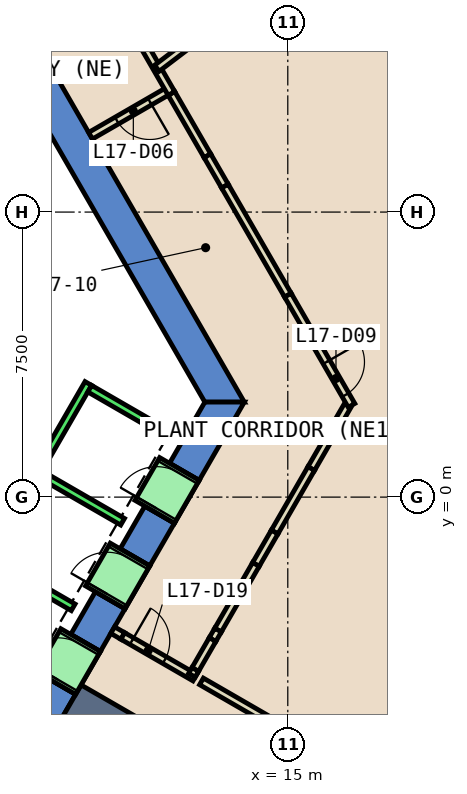
"""IFC4 building model, lengths in metres.
Left out: names, types, materials, properties, quantities, classifications, styles, units other than length and angle.
Written with IfcOpenShell. Run it as: python <this file> out.ifc"""

import sys

from ifc_helpers import new_model, si_unit, direction, frame, frame_2d, origin, place, context, subcontext, project, spatial, polyline, rectangle, outline, extrude, element, fill, save


model = new_model("IFC4")
c1 = context("Model", 3, precision=1e-05, world=origin(), true_north=direction((0.0, 1.0)))
c2 = subcontext(c1, "Body", "Model", "MODEL_VIEW")
j1 = project(units=[si_unit("LENGTHUNIT", "METRE"), si_unit("PLANEANGLEUNIT", "RADIAN")], contexts=[c1])
p1 = place(None, origin())
s1 = spatial("IfcSite", under=j1, at=p1, CompositionType="ELEMENT")
p2 = place(p1, origin())
s2 = spatial("IfcBuilding", under=s1, at=p2, CompositionType="ELEMENT")
p3 = place(p2, frame((0.0, 0.0, 81.2)))
s3 = spatial("IfcBuildingStorey", under=s2, at=p3, CompositionType="ELEMENT", Elevation=81.2)
p4 = place(p3, frame((0.0, 0.0, -0.6)))
e1 = element("IfcWall", 1, at=p4, inside=s3, PredefinedType="SHEAR", context=c2, shape_type="SweptSolid", body=[
    extrude(outline(polyline([(8.517, 11.747), (7.738, 11.298), (12.817, 2.5), (13.856, 2.5), (8.517, 11.747)])), origin(), (0.0, 0.0, 1.0), 5.4),
])
p5 = place(p3, frame((0.0, 0.0, -0.6)))
e2 = element("IfcWall", 2, at=p5, inside=s3, PredefinedType="SHEAR", context=c2, shape_type="SweptSolid", body=[
    extrude(outline(polyline([(9.417, -5.189), (8.638, -4.739), (7.988, -5.864), (8.767, -6.314), (9.417, -5.189)])), origin(), (0.0, 0.0, 1.0), 5.4),
])
p6 = place(p3, frame((0.0, 0.0, -0.6)))
e3 = element("IfcWall", 3, at=p6, inside=s3, PredefinedType="SHEAR", context=c2, shape_type="SweptSolid", body=[
    extrude(outline(polyline([(10.717, -2.937), (9.938, -2.487), (9.288, -3.613), (10.067, -4.063), (10.717, -2.937)])), origin(), (0.0, 0.0, 1.0), 5.4),
])
p7 = place(p3, frame((0.0, 0.0, -0.6)))
e4 = element("IfcWall", 4, at=p7, inside=s3, PredefinedType="SHEAR", context=c2, shape_type="SweptSolid", body=[
    extrude(outline(polyline([(12.017, -0.686), (11.238, -0.236), (10.588, -1.361), (11.367, -1.811), (12.017, -0.686)])), origin(), (0.0, 0.0, 1.0), 5.4),
])
p8 = place(p3, frame((0.0, 0.0, -0.6)))
e5 = element("IfcWall", 5, at=p8, inside=s3, PredefinedType="SHEAR", context=c2, shape_type="SweptSolid", body=[
    extrude(outline(polyline([(11.888, 0.89), (12.667, 0.44), (13.856, 2.5), (12.817, 2.5), (11.888, 0.89)])), origin(), (0.0, 0.0, 1.0), 5.4),
])
p9 = place(p3, frame((0.0, 0.0, 3.6)))
e6 = element("IfcWall", 6, at=p9, inside=s3, PredefinedType="SHEAR", context=c2, shape_type="SweptSolid", body=[
    extrude(outline(polyline([(10.067, -4.063), (9.288, -3.613), (8.638, -4.739), (9.417, -5.189), (10.067, -4.063)])), origin(), (0.0, 0.0, 1.0), 1.2),
])
p10 = place(p3, frame((0.0, 0.0, 3.6)))
e7 = element("IfcWall", 7, at=p10, inside=s3, PredefinedType="SHEAR", context=c2, shape_type="SweptSolid", body=[
    extrude(outline(polyline([(11.367, -1.811), (10.588, -1.361), (9.938, -2.487), (10.717, -2.937), (11.367, -1.811)])), origin(), (0.0, 0.0, 1.0), 1.2),
])
p11 = place(p3, frame((0.0, 0.0, 3.6)))
e8 = element("IfcWall", 8, at=p11, inside=s3, PredefinedType="SHEAR", context=c2, shape_type="SweptSolid", body=[
    extrude(outline(polyline([(12.667, 0.44), (11.888, 0.89), (11.238, -0.236), (12.017, -0.686), (12.667, 0.44)])), origin(), (0.0, 0.0, 1.0), 1.2),
])
p12 = place(p3, frame((9.31, -5.375, 0.0), z_axis=(0.0, 0.0, 1.0), x_axis=(0.866022967049, -0.500004220526, 0.0)))
e9 = element("IfcWall", 9, at=p12, inside=s3, PredefinedType="SHEAR", context=c2, shape_type="SweptSolid", body=[
    extrude(rectangle(XDim=35.802, YDim=1.0, at=frame_2d((17.901, 0.0))), origin(), (0.0, 0.0, 1.0), 4.8),
])
p13 = place(p3, frame((10.392, -3.5, 0.0), z_axis=(0.0, 0.0, 1.0), x_axis=(0.865244904171, -0.501349434832, 0.0)))
e10 = element("IfcWall", 10, at=p13, inside=s3, PredefinedType="PARTITIONING", context=c2, shape_type="SweptSolid", body=[
    extrude(rectangle(XDim=0.307, YDim=0.2, at=frame_2d((0.154, 0.0))), origin(), (0.0, 0.0, 1.0), 1.7),
])
p14 = place(p3, frame((12.729, -4.849, 0.0), z_axis=(0.0, 0.0, 1.0), x_axis=(0.866039668463, -0.499975292037, 0.0)))
e11 = element("IfcWall", 11, at=p14, inside=s3, PredefinedType="PARTITIONING", context=c2, shape_type="SweptSolid", body=[
    extrude(rectangle(XDim=33.573, YDim=0.2, at=frame_2d((16.787, 0.0))), origin(), (0.0, 0.0, 1.0), 4.8),
])
p15 = place(p3, frame((11.888, 10.709, 0.0), z_axis=(0.0, 0.0, 1.0), x_axis=(-0.865973769406, -0.500089422704, 0.0)))
e12 = element("IfcWall", 12, at=p15, inside=s3, PredefinedType="PARTITIONING", context=c2, shape_type="SweptSolid", body=[
    extrude(rectangle(XDim=2.399, YDim=0.2, at=frame_2d((1.2, 0.0))), origin(), (0.0, 0.0, 1.0), 4.8),
])
p16 = place(p15, frame((0.6, 0.0, 0.0)))
e13 = element("IfcOpeningElement", 13, at=p16, cuts=e12, PredefinedType="OPENING", context=c2, shape_type="SweptSolid", body=[
    extrude(rectangle(XDim=1.0, YDim=2.1, at=frame_2d((0.5, 1.05))), frame((0.0, 0.11, 0.0), z_axis=(0.0, -1.0, 0.0), x_axis=(1.0, 0.0, 0.0)), (0.0, 0.0, 1.0), 0.22),
])
p17 = place(p3, frame((11.938, 10.622, 0.0), z_axis=(0.0, 0.0, 1.0), x_axis=(0.499811688139, -0.866134098394, 0.0)))
e14 = element("IfcWall", 14, at=p17, inside=s3, PredefinedType="PARTITIONING", context=c2, shape_type="SweptSolid", body=[
    extrude(rectangle(XDim=1.895, YDim=0.2, at=frame_2d((0.947, 0.0))), origin(), (0.0, 0.0, 1.0), 4.8),
])
p18 = place(p3, frame((16.577, 2.413, 0.0), z_axis=(0.0, 0.0, 1.0), x_axis=(-0.499850094852, -0.866111934265, 0.0)))
e15 = element("IfcWall", 15, at=p18, inside=s3, PredefinedType="PARTITIONING", context=c2, shape_type="SweptSolid", body=[
    extrude(rectangle(XDim=0.828, YDim=0.2, at=frame_2d((0.414, 0.0))), origin(), (0.0, 0.0, 1.0), 4.8),
])
p19 = place(p3, frame((10.658, -3.654, 0.0), z_axis=(0.0, 0.0, 1.0), x_axis=(0.866074224396, -0.499915430684, 0.0)))
e16 = element("IfcWall", 16, at=p19, inside=s3, PredefinedType="PARTITIONING", context=c2, shape_type="SweptSolid", body=[
    extrude(rectangle(XDim=2.19, YDim=0.2, at=frame_2d((1.095, 0.0))), origin(), (0.0, 0.0, 1.0), 4.8),
])
p20 = place(p19, frame((0.272, 0.0, 0.0)))
e17 = element("IfcOpeningElement", 17, at=p20, cuts=e16, PredefinedType="OPENING", context=c2, shape_type="SweptSolid", body=[
    extrude(rectangle(XDim=1.0, YDim=2.1, at=frame_2d((0.5, 1.05))), frame((0.0, 0.11, 0.0), z_axis=(0.0, -1.0, 0.0), x_axis=(1.0, 0.0, 0.0)), (0.0, 0.0, 1.0), 0.22),
])
p21 = place(p3, frame((11.211, 11.882, 0.0), z_axis=(0.0, 0.0, 1.0), x_axis=(0.49978541015, -0.866149261849, 0.0)))
e18 = element("IfcWall", 18, at=p21, inside=s3, PredefinedType="PARTITIONING", context=c2, shape_type="SweptSolid", body=[
    extrude(rectangle(XDim=1.455, YDim=0.2, at=frame_2d((0.728, 0.0))), origin(), (0.0, 0.0, 1.0), 4.8),
])
p22 = place(p3, frame((12.885, 8.981, 0.0), z_axis=(0.0, 0.0, 1.0), x_axis=(0.500242282693, -0.865885476611, 0.0)))
e19 = element("IfcWall", 19, at=p22, inside=s3, PredefinedType="PARTITIONING", context=c2, shape_type="SweptSolid", body=[
    extrude(rectangle(XDim=0.921, YDim=0.2, at=frame_2d((0.461, 0.0))), origin(), (0.0, 0.0, 1.0), 2.4),
])
p23 = place(p3, frame((13.346, 8.183, 0.0), z_axis=(0.0, 0.0, 1.0), x_axis=(0.499981780173, -0.866035922751, 0.0)))
e20 = element("IfcWall", 20, at=p23, inside=s3, PredefinedType="PARTITIONING", context=c2, shape_type="SweptSolid", body=[
    extrude(rectangle(XDim=3.314, YDim=0.2, at=frame_2d((1.657, 0.0))), origin(), (0.0, 0.0, 1.0), 4.8),
])
p24 = place(p3, frame((15.003, 5.313, 0.0), z_axis=(0.0, 0.0, 1.0), x_axis=(0.499715696113, -0.8661894845, 0.0)))
e21 = element("IfcWall", 21, at=p24, inside=s3, PredefinedType="PARTITIONING", context=c2, shape_type="SweptSolid", body=[
    extrude(rectangle(XDim=1.042, YDim=0.2, at=frame_2d((0.521, 0.0))), origin(), (0.0, 0.0, 1.0), 2.4),
])
p25 = place(p3, frame((15.524, 4.41, 0.0), z_axis=(0.0, 0.0, 1.0), x_axis=(0.500067667087, -0.865986332649, 0.0)))
e22 = element("IfcWall", 22, at=p25, inside=s3, PredefinedType="PARTITIONING", context=c2, shape_type="SweptSolid", body=[
    extrude(rectangle(XDim=2.306, YDim=0.2, at=frame_2d((1.153, 0.0))), origin(), (0.0, 0.0, 1.0), 4.8),
])
p26 = place(p25, frame((0.988, 0.0, 0.0)))
e23 = element("IfcOpeningElement", 23, at=p26, cuts=e22, PredefinedType="OPENING", context=c2, shape_type="SweptSolid", body=[
    extrude(rectangle(XDim=1.0, YDim=2.1, at=frame_2d((0.5, 1.05))), frame((0.0, 0.11, 0.0), z_axis=(0.0, -1.0, 0.0), x_axis=(1.0, 0.0, 0.0)), (0.0, 0.0, 1.0), 0.22),
])
p27 = place(p3, frame((16.163, 1.696, 0.0), z_axis=(0.0, 0.0, 1.0), x_axis=(-0.500348398615, -0.865824162289, 0.0)))
e24 = element("IfcWall", 24, at=p27, inside=s3, PredefinedType="PARTITIONING", context=c2, shape_type="SweptSolid", body=[
    extrude(rectangle(XDim=1.092, YDim=0.2, at=frame_2d((0.546, 0.0))), origin(), (0.0, 0.0, 1.0), 2.4),
])
p28 = place(p3, frame((15.617, 0.751, 0.0), z_axis=(0.0, 0.0, 1.0), x_axis=(-0.499517771221, -0.866303639744, 0.0)))
e25 = element("IfcWall", 25, at=p28, inside=s3, PredefinedType="PARTITIONING", context=c2, shape_type="SweptSolid", body=[
    extrude(rectangle(XDim=1.928, YDim=0.2, at=frame_2d((0.964, 0.0))), origin(), (0.0, 0.0, 1.0), 4.8),
])
p29 = place(p3, frame((14.654, -0.919, 0.0), z_axis=(0.0, 0.0, 1.0), x_axis=(-0.500508752595, -0.865731476023, 0.0)))
e26 = element("IfcWall", 26, at=p29, inside=s3, PredefinedType="PARTITIONING", context=c2, shape_type="SweptSolid", body=[
    extrude(rectangle(XDim=0.985, YDim=0.2, at=frame_2d((0.493, 0.0))), origin(), (0.0, 0.0, 1.0), 2.4),
])
p30 = place(p3, frame((14.161, -1.772, 0.0), z_axis=(0.0, 0.0, 1.0), x_axis=(-0.49945675742, -0.866338817939, 0.0)))
e27 = element("IfcWall", 27, at=p30, inside=s3, PredefinedType="PARTITIONING", context=c2, shape_type="SweptSolid", body=[
    extrude(rectangle(XDim=1.061, YDim=0.2, at=frame_2d((0.53, 0.0))), origin(), (0.0, 0.0, 1.0), 4.8),
])
p31 = place(p3, frame((13.631, -2.691, 0.0), z_axis=(0.0, 0.0, 1.0), x_axis=(-0.500386541745, -0.865802118755, 0.0)))
e28 = element("IfcWall", 28, at=p31, inside=s3, PredefinedType="PARTITIONING", context=c2, shape_type="SweptSolid", body=[
    extrude(rectangle(XDim=0.933, YDim=0.2, at=frame_2d((0.467, 0.0))), origin(), (0.0, 0.0, 1.0), 2.0),
])
p32 = place(p3, frame((13.164, -3.499, 0.0), z_axis=(0.0, 0.0, 1.0), x_axis=(-0.499234024602, -0.866467188461, 0.0)))
e29 = element("IfcWall", 29, at=p32, inside=s3, PredefinedType="PARTITIONING", context=c2, shape_type="SweptSolid", body=[
    extrude(rectangle(XDim=0.289, YDim=0.2, at=frame_2d((0.144, 0.0))), origin(), (0.0, 0.0, 1.0), 4.8),
])
p33 = place(p3, frame((13.02, -3.749, 0.0), z_axis=(0.0, 0.0, 1.0), x_axis=(-0.500644484719, -0.865652990476, 0.0)))
e30 = element("IfcWall", 30, at=p33, inside=s3, PredefinedType="PARTITIONING", context=c2, shape_type="SweptSolid", body=[
    extrude(rectangle(XDim=0.909, YDim=0.2, at=frame_2d((0.455, 0.0))), origin(), (0.0, 0.0, 1.0), 1.7),
])
p34 = place(p3, frame((12.565, -4.536, 0.0), z_axis=(0.0, 0.0, 1.0), x_axis=(-0.498550056236, -0.866860912388, 0.0)))
e31 = element("IfcWall", 31, at=p34, inside=s3, PredefinedType="PARTITIONING", context=c2, shape_type="SweptSolid", body=[
    extrude(rectangle(XDim=0.174, YDim=0.2, at=frame_2d((0.087, 0.0))), origin(), (0.0, 0.0, 1.0), 4.8),
])
p35 = place(p3, frame((22.198, 19.375, 0.0), z_axis=(0.0, 0.0, 1.0), x_axis=(-0.796086524029, -0.605182820526, 0.0)))
e32 = element("IfcWall", 32, at=p35, inside=s3, PredefinedType="PARTITIONING", context=c2, shape_type="SweptSolid", body=[
    extrude(rectangle(XDim=13.368, YDim=0.2, at=frame_2d((6.684, 0.0))), origin(), (0.0, 0.0, 1.0), 4.8),
])
p36 = place(p3, frame((4.451, -6.19, 0.0), z_axis=(0.0, 0.0, 1.0), x_axis=(0.50000090737, 0.866024879913, 0.0)))
e33 = element("IfcWall", 33, at=p36, inside=s3, PredefinedType="STANDARD", context=c2, shape_type="SweptSolid", body=[
    extrude(rectangle(XDim=10.6, YDim=0.2, at=frame_2d((5.3, 0.0))), origin(), (0.0, 0.0, 1.0), 4.8),
])
for number, where, z_axis, x_axis in (
    (34, (7.188, -1.65, 0.0), (0.0, 0.0, 1.0), (0.866, -0.5, 0.0)),
    (35, (8.488, 0.602, 0.0), (0.0, 0.0, 1.0), (0.866, -0.5, 0.0)),
):
    element("IfcWall", number, at=place(p3, frame(where, z_axis=z_axis, x_axis=x_axis)), inside=s3, PredefinedType="STANDARD", context=c2, shape_type="SweptSolid", body=[
        extrude(rectangle(XDim=2.5, YDim=0.2, at=frame_2d((1.25, 0.0))), origin(), (0.0, 0.0, 1.0), 4.8),
    ])
p37 = place(p3, frame((9.788, 2.853, 0.0), z_axis=(0.0, 0.0, 1.0), x_axis=(0.865998541277, -0.500046524342, 0.0)))
e36 = element("IfcWall", 36, at=p37, inside=s3, PredefinedType="STANDARD", context=c2, shape_type="SweptSolid", body=[
    extrude(rectangle(XDim=2.5, YDim=0.2, at=frame_2d((1.25, 0.0))), origin(), (0.0, 0.0, 1.0), 4.8),
])
p38 = place(p3, frame((8.898, -4.889, 0.0), z_axis=(0.0, 0.0, 1.0), x_axis=(0.500036693733, 0.866004217611, 0.0)))
e37 = element("IfcWall", 37, at=p38, inside=s3, PredefinedType="STANDARD", context=c2, shape_type="SweptSolid", body=[
    extrude(rectangle(XDim=1.3, YDim=1.2, at=frame_2d((0.65, 0.0))), origin(), (0.0, 0.0, 1.0), 2.4),
])
p39 = place(p38, frame((0.1, 0.0, 0.0)))
e38 = element("IfcOpeningElement", 38, at=p39, cuts=e37, PredefinedType="OPENING", context=c2, shape_type="SweptSolid", body=[
    extrude(rectangle(XDim=1.1, YDim=2.3, at=frame_2d((0.55, 1.15))), frame((0.0, 0.61, 0.0), z_axis=(0.0, -1.0, 0.0), x_axis=(1.0, 0.0, 0.0)), (0.0, 0.0, 1.0), 1.22),
])
p40 = place(p3, frame((10.198, -2.637, 0.0), z_axis=(0.0, 0.0, 1.0), x_axis=(0.49989585183, 0.866085525409, 0.0)))
e39 = element("IfcWall", 39, at=p40, inside=s3, PredefinedType="STANDARD", context=c2, shape_type="SweptSolid", body=[
    extrude(rectangle(XDim=1.3, YDim=1.2, at=frame_2d((0.65, 0.0))), origin(), (0.0, 0.0, 1.0), 2.4),
])
p41 = place(p40, frame((0.1, 0.0, 0.0)))
e40 = element("IfcOpeningElement", 40, at=p41, cuts=e39, PredefinedType="OPENING", context=c2, shape_type="SweptSolid", body=[
    extrude(rectangle(XDim=1.1, YDim=2.3, at=frame_2d((0.55, 1.15))), frame((0.0, 0.61, 0.0), z_axis=(0.0, -1.0, 0.0), x_axis=(1.0, 0.0, 0.0)), (0.0, 0.0, 1.0), 1.22),
])
p42 = place(p3, frame((11.498, -0.385, 0.0), z_axis=(0.0, 0.0, 1.0), x_axis=(0.500221244143, 0.865897630733, 0.0)))
e41 = element("IfcWall", 41, at=p42, inside=s3, PredefinedType="STANDARD", context=c2, shape_type="SweptSolid", body=[
    extrude(rectangle(XDim=1.299, YDim=1.2, at=frame_2d((0.65, 0.0))), origin(), (0.0, 0.0, 1.0), 2.4),
])
p43 = place(p42, frame((0.1, 0.0, 0.0)))
e42 = element("IfcOpeningElement", 42, at=p43, cuts=e41, PredefinedType="OPENING", context=c2, shape_type="SweptSolid", body=[
    extrude(rectangle(XDim=1.1, YDim=2.3, at=frame_2d((0.55, 1.15))), frame((0.0, 0.61, 0.0), z_axis=(0.0, -1.0, 0.0), x_axis=(1.0, 0.0, 0.0)), (0.0, 0.0, 1.0), 1.22),
])
p44 = place(p16, origin())
e43 = element("IfcDoor", 43, at=p44, inside=s3, OperationType="SINGLE_SWING_RIGHT", PredefinedType="DOOR", context=c2, shape_type="SweptSolid", body=[
    extrude(rectangle(XDim=1.0, YDim=2.1, at=frame_2d((0.5, 1.05))), frame((0.0, 0.025, 0.0), z_axis=(0.0, -1.0, 0.0), x_axis=(1.0, 0.0, 0.0)), (0.0, 0.0, 1.0), 0.05),
])
fill(e13, e43)
p45 = place(p26, origin())
e44 = element("IfcDoor", 44, at=p45, inside=s3, OperationType="SINGLE_SWING_LEFT", PredefinedType="DOOR", context=c2, shape_type="SweptSolid", body=[
    extrude(rectangle(XDim=1.0, YDim=2.1, at=frame_2d((0.5, 1.05))), frame((0.0, 0.025, 0.0), z_axis=(0.0, -1.0, 0.0), x_axis=(1.0, 0.0, 0.0)), (0.0, 0.0, 1.0), 0.05),
])
fill(e23, e44)
p46 = place(p20, origin())
e45 = element("IfcDoor", 45, at=p46, inside=s3, OperationType="SINGLE_SWING_LEFT", PredefinedType="DOOR", context=c2, shape_type="SweptSolid", body=[
    extrude(rectangle(XDim=1.0, YDim=2.1, at=frame_2d((0.5, 1.05))), frame((0.0, 0.025, 0.0), z_axis=(0.0, -1.0, 0.0), x_axis=(1.0, 0.0, 0.0)), (0.0, 0.0, 1.0), 0.05),
])
fill(e17, e45)
p47 = place(p39, origin())
e46 = element("IfcDoor", 46, at=p47, inside=s3, OperationType="SLIDING_TO_LEFT", PredefinedType="DOOR", context=c2, shape_type="SweptSolid", body=[
    extrude(rectangle(XDim=1.1, YDim=2.3, at=frame_2d((0.55, 1.15))), frame((0.0, 0.025, 0.0), z_axis=(0.0, -1.0, 0.0), x_axis=(1.0, 0.0, 0.0)), (0.0, 0.0, 1.0), 0.05),
])
fill(e38, e46)
p48 = place(p41, origin())
e47 = element("IfcDoor", 47, at=p48, inside=s3, OperationType="SLIDING_TO_LEFT", PredefinedType="DOOR", context=c2, shape_type="SweptSolid", body=[
    extrude(rectangle(XDim=1.1, YDim=2.3, at=frame_2d((0.55, 1.15))), frame((0.0, 0.025, 0.0), z_axis=(0.0, -1.0, 0.0), x_axis=(1.0, 0.0, 0.0)), (0.0, 0.0, 1.0), 0.05),
])
fill(e40, e47)
p49 = place(p43, origin())
e48 = element("IfcDoor", 48, at=p49, inside=s3, OperationType="SLIDING_TO_LEFT", PredefinedType="DOOR", context=c2, shape_type="SweptSolid", body=[
    extrude(rectangle(XDim=1.1, YDim=2.3, at=frame_2d((0.55, 1.15))), frame((0.0, 0.025, 0.0), z_axis=(0.0, -1.0, 0.0), x_axis=(1.0, 0.0, 0.0)), (0.0, 0.0, 1.0), 0.05),
])
fill(e42, e48)
save(model, sys.argv[1])
